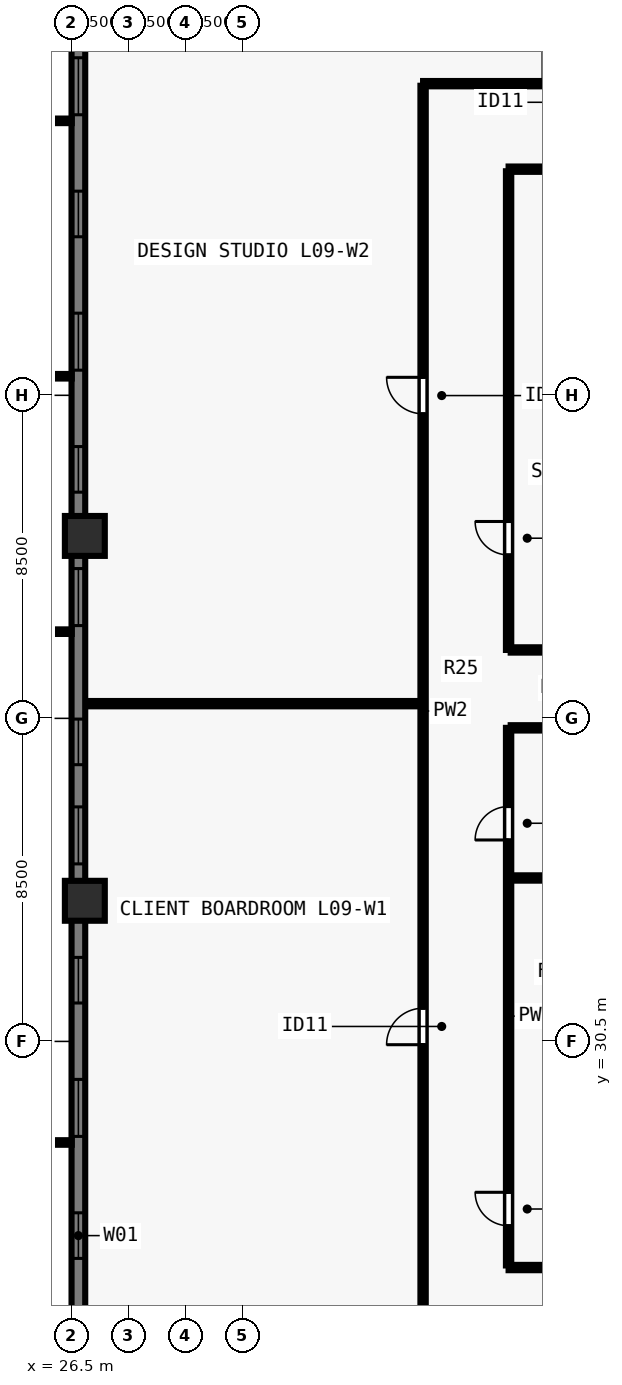
"""IFC4 building model, lengths in metres.
Left out: names, types, materials, properties, quantities, classifications, styles, units other than length and angle.
Written with IfcOpenShell. Run it as: python <this file> out.ifc"""

import sys

from ifc_helpers import new_model, si_unit, direction, frame, frame_2d, origin, origin_2d, place, context, subcontext, project, spatial, rectangle, extrude, element, fill, save


model = new_model("IFC4")
c1 = context("Model", 3, precision=1e-05, world=origin(), true_north=direction((0.0, 1.0)))
c2 = subcontext(c1, "Body", "Model", "MODEL_VIEW")
j1 = project(units=[si_unit("LENGTHUNIT", "METRE"), si_unit("PLANEANGLEUNIT", "RADIAN")], contexts=[c1])
p1 = place(None, origin())
s1 = spatial("IfcSite", under=j1, at=p1, CompositionType="ELEMENT")
p2 = place(p1, origin())
s2 = spatial("IfcBuilding", under=s1, at=p2, CompositionType="ELEMENT")
p3 = place(p2, frame((0.0, 0.0, 37.5)))
s3 = spatial("IfcBuildingStorey", under=s2, at=p3, CompositionType="ELEMENT", Elevation=37.5)
for number, where, z_axis, x_axis in (
    (1, (26.85, 43.8, 0.0), (0.0, 0.0, 1.0), (0.0, 1.0, 0.0)),
    (2, (26.85, 34.2, 0.0), (0.0, 0.0, 1.0), (0.0, 1.0, 0.0)),
):
    element("IfcColumn", number, at=place(p3, frame(where, z_axis=z_axis, x_axis=x_axis)), inside=s3, PredefinedType="COLUMN", context=c2, shape_type="SweptSolid", body=[
        extrude(rectangle(XDim=1.05, YDim=1.05, at=origin_2d()), origin(), (0.0, 0.0, 1.0), 3.5),
    ])
p4 = place(p3, frame((26.68, 16.5, 0.0), z_axis=(0.0, 0.0, 1.0), x_axis=(0.0, 1.0, 0.0)))
e3 = element("IfcWall", 3, at=p4, inside=s3, PredefinedType="SOLIDWALL", context=c2, shape_type="SweptSolid", body=[
    extrude(rectangle(XDim=44.662, YDim=0.36, at=frame_2d((22.331, 0.0))), origin(), (0.0, 0.0, 1.0), 3.28),
])
p5 = place(p4, frame((4.78, 0.0, 0.8)))
e4 = element("IfcOpeningElement", 4, at=p5, cuts=e3, PredefinedType="OPENING", context=c2, shape_type="SweptSolid", body=[
    extrude(rectangle(XDim=1.5, YDim=1.544, at=frame_2d((0.75, 0.772))), frame((0.0, 0.19, 0.0), z_axis=(0.0, -1.0, 0.0), x_axis=(1.0, 0.0, 0.0)), (0.0, 0.0, 1.0), 0.38),
])
p6 = place(p4, frame((8.29, 0.0, 0.8)))
e5 = element("IfcOpeningElement", 5, at=p6, cuts=e3, PredefinedType="OPENING", context=c2, shape_type="SweptSolid", body=[
    extrude(rectangle(XDim=1.2, YDim=1.544, at=frame_2d((0.6, 0.772))), frame((0.0, 0.19, 0.0), z_axis=(0.0, -1.0, 0.0), x_axis=(1.0, 0.0, 0.0)), (0.0, 0.0, 1.0), 0.38),
])
p7 = place(p4, frame((11.5, 0.0, 0.8)))
e6 = element("IfcOpeningElement", 6, at=p7, cuts=e3, PredefinedType="OPENING", context=c2, shape_type="SweptSolid", body=[
    extrude(rectangle(XDim=1.5, YDim=1.544, at=frame_2d((0.75, 0.772))), frame((0.0, 0.19, 0.0), z_axis=(0.0, -1.0, 0.0), x_axis=(1.0, 0.0, 0.0)), (0.0, 0.0, 1.0), 0.38),
])
p8 = place(p4, frame((15.01, 0.0, 0.8)))
e7 = element("IfcOpeningElement", 7, at=p8, cuts=e3, PredefinedType="OPENING", context=c2, shape_type="SweptSolid", body=[
    extrude(rectangle(XDim=1.2, YDim=1.544, at=frame_2d((0.6, 0.772))), frame((0.0, 0.19, 0.0), z_axis=(0.0, -1.0, 0.0), x_axis=(1.0, 0.0, 0.0)), (0.0, 0.0, 1.0), 0.38),
])
p9 = place(p4, frame((18.671, 0.0, 0.8)))
e8 = element("IfcOpeningElement", 8, at=p9, cuts=e3, PredefinedType="OPENING", context=c2, shape_type="SweptSolid", body=[
    extrude(rectangle(XDim=1.5, YDim=1.544, at=frame_2d((0.75, 0.772))), frame((0.0, 0.19, 0.0), z_axis=(0.0, -1.0, 0.0), x_axis=(1.0, 0.0, 0.0)), (0.0, 0.0, 1.0), 0.38),
])
p10 = place(p4, frame((21.281, 0.0, 0.8)))
e9 = element("IfcOpeningElement", 9, at=p10, cuts=e3, PredefinedType="OPENING", context=c2, shape_type="SweptSolid", body=[
    extrude(rectangle(XDim=1.2, YDim=1.544, at=frame_2d((0.6, 0.772))), frame((0.0, 0.19, 0.0), z_axis=(0.0, -1.0, 0.0), x_axis=(1.0, 0.0, 0.0)), (0.0, 0.0, 1.0), 0.38),
])
p11 = place(p4, frame((24.941, 0.0, 0.8)))
e10 = element("IfcOpeningElement", 10, at=p11, cuts=e3, PredefinedType="OPENING", context=c2, shape_type="SweptSolid", body=[
    extrude(rectangle(XDim=1.5, YDim=1.544, at=frame_2d((0.75, 0.772))), frame((0.0, 0.19, 0.0), z_axis=(0.0, -1.0, 0.0), x_axis=(1.0, 0.0, 0.0)), (0.0, 0.0, 1.0), 0.38),
])
p12 = place(p4, frame((28.451, 0.0, 0.8)))
e11 = element("IfcOpeningElement", 11, at=p12, cuts=e3, PredefinedType="OPENING", context=c2, shape_type="SweptSolid", body=[
    extrude(rectangle(XDim=1.2, YDim=1.544, at=frame_2d((0.6, 0.772))), frame((0.0, 0.19, 0.0), z_axis=(0.0, -1.0, 0.0), x_axis=(1.0, 0.0, 0.0)), (0.0, 0.0, 1.0), 0.38),
])
p13 = place(p4, frame((31.662, 0.0, 0.8)))
e12 = element("IfcOpeningElement", 12, at=p13, cuts=e3, PredefinedType="OPENING", context=c2, shape_type="SweptSolid", body=[
    extrude(rectangle(XDim=1.5, YDim=1.544, at=frame_2d((0.75, 0.772))), frame((0.0, 0.19, 0.0), z_axis=(0.0, -1.0, 0.0), x_axis=(1.0, 0.0, 0.0)), (0.0, 0.0, 1.0), 0.38),
])
p14 = place(p4, frame((35.172, 0.0, 0.8)))
e13 = element("IfcOpeningElement", 13, at=p14, cuts=e3, PredefinedType="OPENING", context=c2, shape_type="SweptSolid", body=[
    extrude(rectangle(XDim=1.2, YDim=1.544, at=frame_2d((0.6, 0.772))), frame((0.0, 0.19, 0.0), z_axis=(0.0, -1.0, 0.0), x_axis=(1.0, 0.0, 0.0)), (0.0, 0.0, 1.0), 0.38),
])
p15 = place(p4, frame((38.382, 0.0, 0.8)))
e14 = element("IfcOpeningElement", 14, at=p15, cuts=e3, PredefinedType="OPENING", context=c2, shape_type="SweptSolid", body=[
    extrude(rectangle(XDim=1.5, YDim=1.544, at=frame_2d((0.75, 0.772))), frame((0.0, 0.19, 0.0), z_axis=(0.0, -1.0, 0.0), x_axis=(1.0, 0.0, 0.0)), (0.0, 0.0, 1.0), 0.38),
])
p16 = place(p3, frame((35.75, 55.7, 0.0), z_axis=(0.0, 0.0, 1.0), x_axis=(1.0, 0.0, 0.0)))
e15 = element("IfcWall", 15, at=p16, inside=s3, PredefinedType="PARTITIONING", context=c2, shape_type="SweptSolid", body=[
    extrude(rectangle(XDim=32.5, YDim=0.14, at=frame_2d((16.25, 0.0))), origin(), (0.0, 0.0, 1.0), 3.28),
])
p17 = place(p16, frame((3.154, 0.0, 0.0)))
e16 = element("IfcOpeningElement", 16, at=p17, cuts=e15, PredefinedType="OPENING", context=c2, shape_type="SweptSolid", body=[
    extrude(rectangle(XDim=0.96, YDim=2.12, at=frame_2d((0.48, 1.06))), frame((0.0, 0.08, 0.0), z_axis=(0.0, -1.0, 0.0), x_axis=(1.0, 0.0, 0.0)), (0.0, 0.0, 1.0), 0.16),
])
p18 = place(p16, frame((27.834, 0.0, 0.0)))
e17 = element("IfcOpeningElement", 17, at=p18, cuts=e15, PredefinedType="OPENING", context=c2, shape_type="SweptSolid", body=[
    extrude(rectangle(XDim=0.96, YDim=2.12, at=frame_2d((0.48, 1.06))), frame((0.0, 0.08, 0.0), z_axis=(0.0, -1.0, 0.0), x_axis=(1.0, 0.0, 0.0)), (0.0, 0.0, 1.0), 0.16),
])
p19 = place(p3, frame((35.75, 22.355, 0.0), z_axis=(0.0, 0.0, 1.0), x_axis=(0.0, 1.0, 0.0)))
e18 = element("IfcWall", 18, at=p19, inside=s3, PredefinedType="PARTITIONING", context=c2, shape_type="SweptSolid", body=[
    extrude(rectangle(XDim=33.29, YDim=0.14, at=frame_2d((16.645, 0.0))), origin(), (0.0, 0.0, 1.0), 3.28),
])
p20 = place(p19, frame((8.058, 0.0, 0.0)))
e19 = element("IfcOpeningElement", 19, at=p20, cuts=e18, PredefinedType="OPENING", context=c2, shape_type="SweptSolid", body=[
    extrude(rectangle(XDim=0.96, YDim=2.12, at=frame_2d((0.48, 1.06))), frame((0.0, 0.08, 0.0), z_axis=(0.0, -1.0, 0.0), x_axis=(1.0, 0.0, 0.0)), (0.0, 0.0, 1.0), 0.16),
])
p21 = place(p19, frame((24.658, 0.0, 0.0)))
e20 = element("IfcOpeningElement", 20, at=p21, cuts=e18, PredefinedType="OPENING", context=c2, shape_type="SweptSolid", body=[
    extrude(rectangle(XDim=0.96, YDim=2.12, at=frame_2d((0.48, 1.06))), frame((0.0, 0.08, 0.0), z_axis=(0.0, -1.0, 0.0), x_axis=(1.0, 0.0, 0.0)), (0.0, 0.0, 1.0), 0.16),
])
p22 = place(p3, frame((38.0, 24.55, 0.0), z_axis=(0.0, 0.0, 1.0), x_axis=(1.0, 0.0, 0.0)))
e21 = element("IfcWall", 21, at=p22, inside=s3, PredefinedType="PARTITIONING", context=c2, shape_type="SweptSolid", body=[
    extrude(rectangle(XDim=28.0, YDim=0.14, at=frame_2d((14.0, 0.0))), origin(), (0.0, 0.0, 1.0), 3.28),
])
p23 = place(p22, frame((1.2, 0.0, 0.0)))
e22 = element("IfcOpeningElement", 22, at=p23, cuts=e21, PredefinedType="OPENING", context=c2, shape_type="SweptSolid", body=[
    extrude(rectangle(XDim=0.88, YDim=2.1, at=frame_2d((0.44, 1.05))), frame((0.0, 0.08, 0.0), z_axis=(0.0, -1.0, 0.0), x_axis=(1.0, 0.0, 0.0)), (0.0, 0.0, 1.0), 0.16),
])
p24 = place(p22, frame((10.5, 0.0, 0.0)))
e23 = element("IfcOpeningElement", 23, at=p24, cuts=e21, PredefinedType="OPENING", context=c2, shape_type="SweptSolid", body=[
    extrude(rectangle(XDim=0.88, YDim=2.1, at=frame_2d((0.44, 1.05))), frame((0.0, 0.08, 0.0), z_axis=(0.0, -1.0, 0.0), x_axis=(1.0, 0.0, 0.0)), (0.0, 0.0, 1.0), 0.16),
])
p25 = place(p22, frame((21.0, 0.0, 0.0)))
e24 = element("IfcOpeningElement", 24, at=p25, cuts=e21, PredefinedType="OPENING", context=c2, shape_type="SweptSolid", body=[
    extrude(rectangle(XDim=0.88, YDim=2.1, at=frame_2d((0.44, 1.05))), frame((0.0, 0.08, 0.0), z_axis=(0.0, -1.0, 0.0), x_axis=(1.0, 0.0, 0.0)), (0.0, 0.0, 1.0), 0.16),
])
p26 = place(p3, frame((38.0, 53.45, 0.0), z_axis=(0.0, 0.0, 1.0), x_axis=(1.0, 0.0, 0.0)))
e25 = element("IfcWall", 25, at=p26, inside=s3, PredefinedType="PARTITIONING", context=c2, shape_type="SweptSolid", body=[
    extrude(rectangle(XDim=28.0, YDim=0.14, at=frame_2d((14.0, 0.0))), origin(), (0.0, 0.0, 1.0), 3.28),
])
p27 = place(p26, frame((2.2, 0.0, 0.0)))
e26 = element("IfcOpeningElement", 26, at=p27, cuts=e25, PredefinedType="OPENING", context=c2, shape_type="SweptSolid", body=[
    extrude(rectangle(XDim=0.88, YDim=2.1, at=frame_2d((0.44, 1.05))), frame((0.0, 0.08, 0.0), z_axis=(0.0, -1.0, 0.0), x_axis=(1.0, 0.0, 0.0)), (0.0, 0.0, 1.0), 0.16),
])
p28 = place(p26, frame((14.5, 0.0, 0.0)))
e27 = element("IfcOpeningElement", 27, at=p28, cuts=e25, PredefinedType="OPENING", context=c2, shape_type="SweptSolid", body=[
    extrude(rectangle(XDim=0.88, YDim=2.1, at=frame_2d((0.44, 1.05))), frame((0.0, 0.08, 0.0), z_axis=(0.0, -1.0, 0.0), x_axis=(1.0, 0.0, 0.0)), (0.0, 0.0, 1.0), 0.16),
])
p29 = place(p26, frame((24.0, 0.0, 0.0)))
e28 = element("IfcOpeningElement", 28, at=p29, cuts=e25, PredefinedType="OPENING", context=c2, shape_type="SweptSolid", body=[
    extrude(rectangle(XDim=0.88, YDim=2.1, at=frame_2d((0.44, 1.05))), frame((0.0, 0.08, 0.0), z_axis=(0.0, -1.0, 0.0), x_axis=(1.0, 0.0, 0.0)), (0.0, 0.0, 1.0), 0.16),
])
p30 = place(p3, frame((38.0, 24.605, 0.0), z_axis=(0.0, 0.0, 1.0), x_axis=(0.0, 1.0, 0.0)))
e29 = element("IfcWall", 29, at=p30, inside=s3, PredefinedType="PARTITIONING", context=c2, shape_type="SweptSolid", body=[
    extrude(rectangle(XDim=14.145, YDim=0.14, at=frame_2d((7.073, 0.0))), origin(), (0.0, 0.0, 1.0), 3.28),
])
p31 = place(p30, frame((1.045, 0.0, 0.0)))
e30 = element("IfcOpeningElement", 30, at=p31, cuts=e29, PredefinedType="OPENING", context=c2, shape_type="SweptSolid", body=[
    extrude(rectangle(XDim=0.88, YDim=2.1, at=frame_2d((0.44, 1.05))), frame((0.0, 0.08, 0.0), z_axis=(0.0, -1.0, 0.0), x_axis=(1.0, 0.0, 0.0)), (0.0, 0.0, 1.0), 0.16),
])
p32 = place(p30, frame((11.195, 0.0, 0.0)))
e31 = element("IfcOpeningElement", 31, at=p32, cuts=e29, PredefinedType="OPENING", context=c2, shape_type="SweptSolid", body=[
    extrude(rectangle(XDim=0.88, YDim=2.1, at=frame_2d((0.44, 1.05))), frame((0.0, 0.08, 0.0), z_axis=(0.0, -1.0, 0.0), x_axis=(1.0, 0.0, 0.0)), (0.0, 0.0, 1.0), 0.16),
])
p33 = place(p3, frame((38.0, 40.8, 0.0), z_axis=(0.0, 0.0, 1.0), x_axis=(0.0, 1.0, 0.0)))
e32 = element("IfcWall", 32, at=p33, inside=s3, PredefinedType="PARTITIONING", context=c2, shape_type="SweptSolid", body=[
    extrude(rectangle(XDim=12.595, YDim=0.14, at=frame_2d((6.297, 0.0))), origin(), (0.0, 0.0, 1.0), 3.28),
])
p34 = place(p33, frame((2.5, 0.0, 0.0)))
e33 = element("IfcOpeningElement", 33, at=p34, cuts=e32, PredefinedType="OPENING", context=c2, shape_type="SweptSolid", body=[
    extrude(rectangle(XDim=0.88, YDim=2.1, at=frame_2d((0.44, 1.05))), frame((0.0, 0.08, 0.0), z_axis=(0.0, -1.0, 0.0), x_axis=(1.0, 0.0, 0.0)), (0.0, 0.0, 1.0), 0.16),
])
for number, where, z_axis, x_axis in (
    (34, (38.055, 38.75, 0.0), (0.0, 0.0, 1.0), (1.0, 0.0, 0.0)),
    (35, (38.055, 40.8, 0.0), (0.0, 0.0, 1.0), (1.0, 0.0, 0.0)),
    (36, (38.055, 34.8, 0.0), (0.0, 0.0, 1.0), (1.0, 0.0, 0.0)),
):
    element("IfcWall", number, at=place(p3, frame(where, z_axis=z_axis, x_axis=x_axis)), inside=s3, PredefinedType="PARTITIONING", context=c2, shape_type="SweptSolid", body=[
        extrude(rectangle(XDim=5.185, YDim=0.14, at=frame_2d((2.593, 0.0))), origin(), (0.0, 0.0, 1.0), 3.28),
    ])
p35 = place(p3, frame((26.92, 39.387, 0.0), z_axis=(0.0, 0.0, 1.0), x_axis=(1.0, 0.0, 0.0)))
e37 = element("IfcWall", 37, at=p35, inside=s3, PredefinedType="PARTITIONING", context=c2, shape_type="SweptSolid", body=[
    extrude(rectangle(XDim=8.73, YDim=0.14, at=frame_2d((4.365, 0.0))), origin(), (0.0, 0.0, 1.0), 2.849),
])
p36 = place(p6, origin())
e38 = element("IfcWindow", 38, at=p36, inside=s3, PartitioningType="SINGLE_PANEL", PredefinedType="WINDOW", context=c2, shape_type="SweptSolid", body=[
    extrude(rectangle(XDim=1.2, YDim=1.544, at=frame_2d((0.6, 0.772))), frame((0.0, -0.05, 0.0), z_axis=(0.0, -1.0, 0.0), x_axis=(1.0, 0.0, 0.0)), (0.0, 0.0, 1.0), 0.06),
])
fill(e5, e38)
p37 = place(p7, origin())
e39 = element("IfcWindow", 39, at=p37, inside=s3, PartitioningType="SINGLE_PANEL", PredefinedType="WINDOW", context=c2, shape_type="SweptSolid", body=[
    extrude(rectangle(XDim=1.5, YDim=1.544, at=frame_2d((0.75, 0.772))), frame((0.0, -0.05, 0.0), z_axis=(0.0, -1.0, 0.0), x_axis=(1.0, 0.0, 0.0)), (0.0, 0.0, 1.0), 0.06),
])
fill(e6, e39)
p38 = place(p8, origin())
e40 = element("IfcWindow", 40, at=p38, inside=s3, PartitioningType="SINGLE_PANEL", PredefinedType="WINDOW", context=c2, shape_type="SweptSolid", body=[
    extrude(rectangle(XDim=1.2, YDim=1.544, at=frame_2d((0.6, 0.772))), frame((0.0, -0.05, 0.0), z_axis=(0.0, -1.0, 0.0), x_axis=(1.0, 0.0, 0.0)), (0.0, 0.0, 1.0), 0.06),
])
fill(e7, e40)
p39 = place(p9, origin())
e41 = element("IfcWindow", 41, at=p39, inside=s3, PartitioningType="SINGLE_PANEL", PredefinedType="WINDOW", context=c2, shape_type="SweptSolid", body=[
    extrude(rectangle(XDim=1.5, YDim=1.544, at=frame_2d((0.75, 0.772))), frame((0.0, -0.05, 0.0), z_axis=(0.0, -1.0, 0.0), x_axis=(1.0, 0.0, 0.0)), (0.0, 0.0, 1.0), 0.06),
])
fill(e8, e41)
p40 = place(p10, origin())
e42 = element("IfcWindow", 42, at=p40, inside=s3, PartitioningType="SINGLE_PANEL", PredefinedType="WINDOW", context=c2, shape_type="SweptSolid", body=[
    extrude(rectangle(XDim=1.2, YDim=1.544, at=frame_2d((0.6, 0.772))), frame((0.0, -0.05, 0.0), z_axis=(0.0, -1.0, 0.0), x_axis=(1.0, 0.0, 0.0)), (0.0, 0.0, 1.0), 0.06),
])
fill(e9, e42)
p41 = place(p11, origin())
e43 = element("IfcWindow", 43, at=p41, inside=s3, PartitioningType="SINGLE_PANEL", PredefinedType="WINDOW", context=c2, shape_type="SweptSolid", body=[
    extrude(rectangle(XDim=1.5, YDim=1.544, at=frame_2d((0.75, 0.772))), frame((0.0, -0.05, 0.0), z_axis=(0.0, -1.0, 0.0), x_axis=(1.0, 0.0, 0.0)), (0.0, 0.0, 1.0), 0.06),
])
fill(e10, e43)
p42 = place(p12, origin())
e44 = element("IfcWindow", 44, at=p42, inside=s3, PartitioningType="SINGLE_PANEL", PredefinedType="WINDOW", context=c2, shape_type="SweptSolid", body=[
    extrude(rectangle(XDim=1.2, YDim=1.544, at=frame_2d((0.6, 0.772))), frame((0.0, -0.05, 0.0), z_axis=(0.0, -1.0, 0.0), x_axis=(1.0, 0.0, 0.0)), (0.0, 0.0, 1.0), 0.06),
])
fill(e11, e44)
p43 = place(p13, origin())
e45 = element("IfcWindow", 45, at=p43, inside=s3, PartitioningType="SINGLE_PANEL", PredefinedType="WINDOW", context=c2, shape_type="SweptSolid", body=[
    extrude(rectangle(XDim=1.5, YDim=1.544, at=frame_2d((0.75, 0.772))), frame((0.0, -0.05, 0.0), z_axis=(0.0, -1.0, 0.0), x_axis=(1.0, 0.0, 0.0)), (0.0, 0.0, 1.0), 0.06),
])
fill(e12, e45)
p44 = place(p14, origin())
e46 = element("IfcWindow", 46, at=p44, inside=s3, PartitioningType="SINGLE_PANEL", PredefinedType="WINDOW", context=c2, shape_type="SweptSolid", body=[
    extrude(rectangle(XDim=1.2, YDim=1.544, at=frame_2d((0.6, 0.772))), frame((0.0, -0.05, 0.0), z_axis=(0.0, -1.0, 0.0), x_axis=(1.0, 0.0, 0.0)), (0.0, 0.0, 1.0), 0.06),
])
fill(e13, e46)
p45 = place(p15, origin())
e47 = element("IfcWindow", 47, at=p45, inside=s3, PartitioningType="SINGLE_PANEL", PredefinedType="WINDOW", context=c2, shape_type="SweptSolid", body=[
    extrude(rectangle(XDim=1.5, YDim=1.544, at=frame_2d((0.75, 0.772))), frame((0.0, -0.05, 0.0), z_axis=(0.0, -1.0, 0.0), x_axis=(1.0, 0.0, 0.0)), (0.0, 0.0, 1.0), 0.06),
])
fill(e14, e47)
p46 = place(p31, origin())
e48 = element("IfcDoor", 48, at=p46, inside=s3, OperationType="SINGLE_SWING_RIGHT", PredefinedType="DOOR", context=c2, shape_type="SweptSolid", body=[
    extrude(rectangle(XDim=0.88, YDim=2.1, at=frame_2d((0.44, 1.05))), frame((0.0, 0.025, 0.0), z_axis=(0.0, -1.0, 0.0), x_axis=(1.0, 0.0, 0.0)), (0.0, 0.0, 1.0), 0.05),
])
fill(e30, e48)
p47 = place(p32, origin())
e49 = element("IfcDoor", 49, at=p47, inside=s3, OperationType="SINGLE_SWING_LEFT", PredefinedType="DOOR", context=c2, shape_type="SweptSolid", body=[
    extrude(rectangle(XDim=0.88, YDim=2.1, at=frame_2d((0.44, 1.05))), frame((0.0, 0.025, 0.0), z_axis=(0.0, -1.0, 0.0), x_axis=(1.0, 0.0, 0.0)), (0.0, 0.0, 1.0), 0.05),
])
fill(e31, e49)
p48 = place(p34, origin())
e50 = element("IfcDoor", 50, at=p48, inside=s3, OperationType="SINGLE_SWING_RIGHT", PredefinedType="DOOR", context=c2, shape_type="SweptSolid", body=[
    extrude(rectangle(XDim=0.88, YDim=2.1, at=frame_2d((0.44, 1.05))), frame((0.0, 0.025, 0.0), z_axis=(0.0, -1.0, 0.0), x_axis=(1.0, 0.0, 0.0)), (0.0, 0.0, 1.0), 0.05),
])
fill(e33, e50)
p49 = place(p20, origin())
e51 = element("IfcDoor", 51, at=p49, inside=s3, OperationType="SINGLE_SWING_LEFT", PredefinedType="DOOR", context=c2, shape_type="SweptSolid", body=[
    extrude(rectangle(XDim=0.96, YDim=2.12, at=frame_2d((0.48, 1.06))), frame((0.0, 0.025, 0.0), z_axis=(0.0, -1.0, 0.0), x_axis=(1.0, 0.0, 0.0)), (0.0, 0.0, 1.0), 0.05),
])
fill(e19, e51)
p50 = place(p21, origin())
e52 = element("IfcDoor", 52, at=p50, inside=s3, OperationType="SINGLE_SWING_RIGHT", PredefinedType="DOOR", context=c2, shape_type="SweptSolid", body=[
    extrude(rectangle(XDim=0.96, YDim=2.12, at=frame_2d((0.48, 1.06))), frame((0.0, 0.025, 0.0), z_axis=(0.0, -1.0, 0.0), x_axis=(1.0, 0.0, 0.0)), (0.0, 0.0, 1.0), 0.05),
])
fill(e20, e52)
save(model, sys.argv[1])
